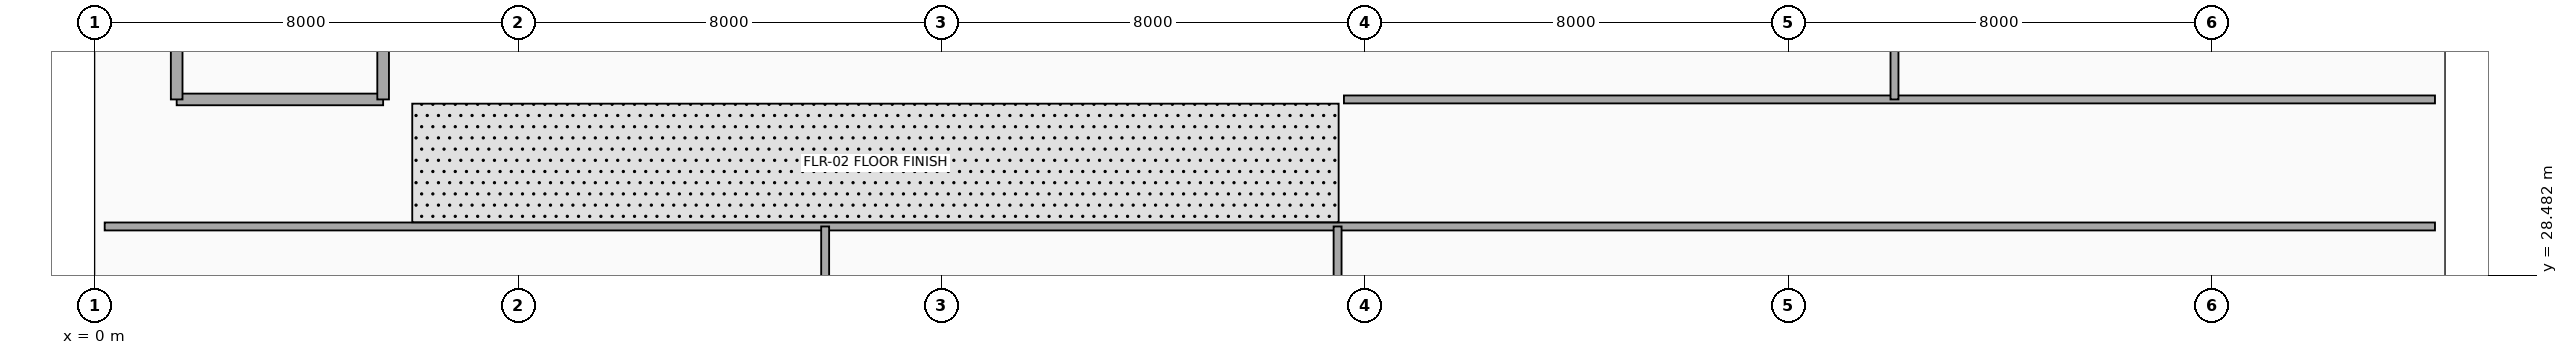
"""IFC4 building model, lengths in metres.
Left out: names, types, materials, properties, quantities, classifications, styles, units other than length and angle.
Written with IfcOpenShell. Run it as: python <this file> out.ifc"""

import sys

from ifc_helpers import new_model, si_unit, direction, frame, frame_2d, origin, place, context, subcontext, project, spatial, rectangle, extrude, element, fill, save


model = new_model("IFC4")
c1 = context("Model", 3, precision=1e-05, world=origin(), true_north=direction((0.0, 1.0)))
c2 = subcontext(c1, "Body", "Model", "MODEL_VIEW")
j1 = project(units=[si_unit("LENGTHUNIT", "METRE"), si_unit("PLANEANGLEUNIT", "RADIAN")], contexts=[c1])
p1 = place(None, origin())
s1 = spatial("IfcSite", under=j1, at=p1, CompositionType="ELEMENT")
p2 = place(p1, origin())
s2 = spatial("IfcBuilding", under=s1, at=p2, CompositionType="ELEMENT")
p3 = place(p2, frame((0.0, 0.0, 347.49)))
s3 = spatial("IfcBuildingStorey", under=s2, at=p3, CompositionType="ELEMENT", Elevation=347.49)
p4 = place(p3, frame((1.55, 31.8, 0.0), z_axis=(0.0, 0.0, 1.0), x_axis=(1.0, 0.0, 0.0)))
e1 = element("IfcWall", 1, at=p4, inside=s3, PredefinedType="PARTITIONING", context=c2, shape_type="SweptSolid", body=[
    extrude(rectangle(XDim=3.9, YDim=0.22, at=frame_2d((1.95, 0.0))), origin(), (0.0, 0.0, 1.0), 4.37),
])
p5 = place(p4, frame((1.52, 0.0, 0.0), z_axis=(0.0, 0.0, 1.0), x_axis=(-1.0, 0.0, 0.0)))
e2 = element("IfcOpeningElement", 2, at=p5, cuts=e1, PredefinedType="OPENING", context=c2, shape_type="SweptSolid", body=[
    extrude(rectangle(XDim=1.1, YDim=2.2, at=frame_2d((0.55, 1.1))), frame((0.0, 0.12, 0.0), z_axis=(0.0, -1.0, 0.0), x_axis=(1.0, 0.0, 0.0)), (0.0, 0.0, 1.0), 0.24),
])
p6 = place(p4, frame((3.42, 0.0, 0.0), z_axis=(0.0, 0.0, 1.0), x_axis=(-1.0, 0.0, 0.0)))
e3 = element("IfcOpeningElement", 3, at=p6, cuts=e1, PredefinedType="OPENING", context=c2, shape_type="SweptSolid", body=[
    extrude(rectangle(XDim=1.1, YDim=2.2, at=frame_2d((0.55, 1.1))), frame((0.0, 0.12, 0.0), z_axis=(0.0, -1.0, 0.0), x_axis=(1.0, 0.0, 0.0)), (0.0, 0.0, 1.0), 0.24),
])
for number, where, z_axis, x_axis in (
    (4, (1.55, 31.8, 0.0), (0.0, 0.0, 1.0), (0.0, 1.0, 0.0)),
    (5, (5.45, 31.8, 0.0), (0.0, 0.0, 1.0), (0.0, 1.0, 0.0)),
):
    element("IfcWall", number, at=place(p3, frame(where, z_axis=z_axis, x_axis=x_axis)), inside=s3, PredefinedType="PARTITIONING", context=c2, shape_type="SweptSolid", body=[
        extrude(rectangle(XDim=2.38, YDim=0.22, at=frame_2d((1.19, 0.0))), origin(), (0.0, 0.0, 1.0), 4.37),
    ])
p7 = place(p3, frame((0.19, 29.4, 0.0), z_axis=(0.0, 0.0, 1.0), x_axis=(1.0, 0.0, 0.0)))
e6 = element("IfcWall", 6, at=p7, inside=s3, PredefinedType="PARTITIONING", context=c2, shape_type="SweptSolid", body=[
    extrude(rectangle(XDim=44.02, YDim=0.15, at=frame_2d((22.01, 0.0))), origin(), (0.0, 0.0, 1.0), 4.055),
])
p8 = place(p7, frame((4.0, 0.0, 0.0)))
e7 = element("IfcOpeningElement", 7, at=p8, cuts=e6, PredefinedType="OPENING", context=c2, shape_type="SweptSolid", body=[
    extrude(rectangle(XDim=1.8, YDim=2.3, at=frame_2d((0.9, 1.15))), frame((0.0, 0.085, 0.0), z_axis=(0.0, -1.0, 0.0), x_axis=(1.0, 0.0, 0.0)), (0.0, 0.0, 1.0), 0.17),
])
p9 = place(p7, frame((15.0, 0.0, 0.0)))
e8 = element("IfcOpeningElement", 8, at=p9, cuts=e6, PredefinedType="OPENING", context=c2, shape_type="SweptSolid", body=[
    extrude(rectangle(XDim=1.8, YDim=2.3, at=frame_2d((0.9, 1.15))), frame((0.0, 0.085, 0.0), z_axis=(0.0, -1.0, 0.0), x_axis=(1.0, 0.0, 0.0)), (0.0, 0.0, 1.0), 0.17),
])
p10 = place(p7, frame((27.0, 0.0, 0.0)))
e9 = element("IfcOpeningElement", 9, at=p10, cuts=e6, PredefinedType="OPENING", context=c2, shape_type="SweptSolid", body=[
    extrude(rectangle(XDim=1.05, YDim=2.15, at=frame_2d((0.525, 1.075))), frame((0.0, 0.085, 0.0), z_axis=(0.0, -1.0, 0.0), x_axis=(1.0, 0.0, 0.0)), (0.0, 0.0, 1.0), 0.17),
])
p11 = place(p3, frame((23.6, 31.8, 0.0), z_axis=(0.0, 0.0, 1.0), x_axis=(1.0, 0.0, 0.0)))
e10 = element("IfcWall", 10, at=p11, inside=s3, PredefinedType="PARTITIONING", context=c2, shape_type="SweptSolid", body=[
    extrude(rectangle(XDim=20.61, YDim=0.15, at=frame_2d((10.305, 0.0))), origin(), (0.0, 0.0, 1.0), 4.37),
])
p12 = place(p11, frame((3.0, 0.0, 0.0)))
e11 = element("IfcOpeningElement", 11, at=p12, cuts=e10, PredefinedType="OPENING", context=c2, shape_type="SweptSolid", body=[
    extrude(rectangle(XDim=1.05, YDim=2.15, at=frame_2d((0.525, 1.075))), frame((0.0, 0.085, 0.0), z_axis=(0.0, -1.0, 0.0), x_axis=(1.0, 0.0, 0.0)), (0.0, 0.0, 1.0), 0.17),
])
p13 = place(p11, frame((12.0, 0.0, 0.0)))
e12 = element("IfcOpeningElement", 12, at=p13, cuts=e10, PredefinedType="OPENING", context=c2, shape_type="SweptSolid", body=[
    extrude(rectangle(XDim=0.95, YDim=2.15, at=frame_2d((0.475, 1.075))), frame((0.0, 0.085, 0.0), z_axis=(0.0, -1.0, 0.0), x_axis=(1.0, 0.0, 0.0)), (0.0, 0.0, 1.0), 0.17),
])
p14 = place(p3, frame((13.8, 11.79, 0.0), z_axis=(0.0, 0.0, 1.0), x_axis=(0.0, 1.0, 0.0)))
e13 = element("IfcWall", 13, at=p14, inside=s3, PredefinedType="PARTITIONING", context=c2, shape_type="SweptSolid", body=[
    extrude(rectangle(XDim=17.61, YDim=0.15, at=frame_2d((8.805, 0.0))), origin(), (0.0, 0.0, 1.0), 4.37),
])
p15 = place(p3, frame((23.48, 25.19, 0.0), z_axis=(0.0, 0.0, 1.0), x_axis=(0.0, 1.0, 0.0)))
e14 = element("IfcWall", 14, at=p15, inside=s3, PredefinedType="PARTITIONING", context=c2, shape_type="SweptSolid", body=[
    extrude(rectangle(XDim=4.21, YDim=0.15, at=frame_2d((2.105, 0.0))), origin(), (0.0, 0.0, 1.0), 3.855),
])
p16 = place(p3, frame((34.0, 31.8, 0.0), z_axis=(0.0, 0.0, 1.0), x_axis=(0.0, 1.0, 0.0)))
e15 = element("IfcWall", 15, at=p16, inside=s3, PredefinedType="PARTITIONING", context=c2, shape_type="SweptSolid", body=[
    extrude(rectangle(XDim=14.01, YDim=0.15, at=frame_2d((7.005, 0.0))), origin(), (0.0, 0.0, 1.0), 4.37),
])
p17 = place(p5, origin())
e16 = element("IfcDoor", 16, at=p17, inside=s3, OperationType="SLIDING_TO_LEFT", PredefinedType="DOOR", context=c2, shape_type="SweptSolid", body=[
    extrude(rectangle(XDim=1.1, YDim=2.2, at=frame_2d((0.55, 1.1))), frame((0.0, 0.025, 0.0), z_axis=(0.0, -1.0, 0.0), x_axis=(1.0, 0.0, 0.0)), (0.0, 0.0, 1.0), 0.05),
])
fill(e2, e16)
p18 = place(p6, origin())
e17 = element("IfcDoor", 17, at=p18, inside=s3, OperationType="SLIDING_TO_LEFT", PredefinedType="DOOR", context=c2, shape_type="SweptSolid", body=[
    extrude(rectangle(XDim=1.1, YDim=2.2, at=frame_2d((0.55, 1.1))), frame((0.0, 0.025, 0.0), z_axis=(0.0, -1.0, 0.0), x_axis=(1.0, 0.0, 0.0)), (0.0, 0.0, 1.0), 0.05),
])
fill(e3, e17)
p19 = place(p8, origin())
e18 = element("IfcDoor", 18, at=p19, inside=s3, OperationType="SINGLE_SWING_LEFT", PredefinedType="DOOR", context=c2, shape_type="SweptSolid", body=[
    extrude(rectangle(XDim=1.8, YDim=2.3, at=frame_2d((0.9, 1.15))), frame((0.0, 0.025, 0.0), z_axis=(0.0, -1.0, 0.0), x_axis=(1.0, 0.0, 0.0)), (0.0, 0.0, 1.0), 0.05),
])
fill(e7, e18)
p20 = place(p9, origin())
e19 = element("IfcDoor", 19, at=p20, inside=s3, OperationType="SINGLE_SWING_RIGHT", PredefinedType="DOOR", context=c2, shape_type="SweptSolid", body=[
    extrude(rectangle(XDim=1.8, YDim=2.3, at=frame_2d((0.9, 1.15))), frame((0.0, 0.025, 0.0), z_axis=(0.0, -1.0, 0.0), x_axis=(1.0, 0.0, 0.0)), (0.0, 0.0, 1.0), 0.05),
])
fill(e8, e19)
p21 = place(p10, origin())
e20 = element("IfcDoor", 20, at=p21, inside=s3, OperationType="SINGLE_SWING_LEFT", PredefinedType="DOOR", context=c2, shape_type="SweptSolid", body=[
    extrude(rectangle(XDim=1.05, YDim=2.15, at=frame_2d((0.525, 1.075))), frame((0.0, 0.025, 0.0), z_axis=(0.0, -1.0, 0.0), x_axis=(1.0, 0.0, 0.0)), (0.0, 0.0, 1.0), 0.05),
])
fill(e9, e20)
p22 = place(p12, origin())
e21 = element("IfcDoor", 21, at=p22, inside=s3, OperationType="SINGLE_SWING_RIGHT", PredefinedType="DOOR", context=c2, shape_type="SweptSolid", body=[
    extrude(rectangle(XDim=1.05, YDim=2.15, at=frame_2d((0.525, 1.075))), frame((0.0, 0.025, 0.0), z_axis=(0.0, -1.0, 0.0), x_axis=(1.0, 0.0, 0.0)), (0.0, 0.0, 1.0), 0.05),
])
fill(e11, e21)
p23 = place(p13, origin())
e22 = element("IfcDoor", 22, at=p23, inside=s3, OperationType="SINGLE_SWING_LEFT", PredefinedType="DOOR", context=c2, shape_type="SweptSolid", body=[
    extrude(rectangle(XDim=0.95, YDim=2.15, at=frame_2d((0.475, 1.075))), frame((0.0, 0.025, 0.0), z_axis=(0.0, -1.0, 0.0), x_axis=(1.0, 0.0, 0.0)), (0.0, 0.0, 1.0), 0.05),
])
fill(e12, e22)
save(model, sys.argv[1])
